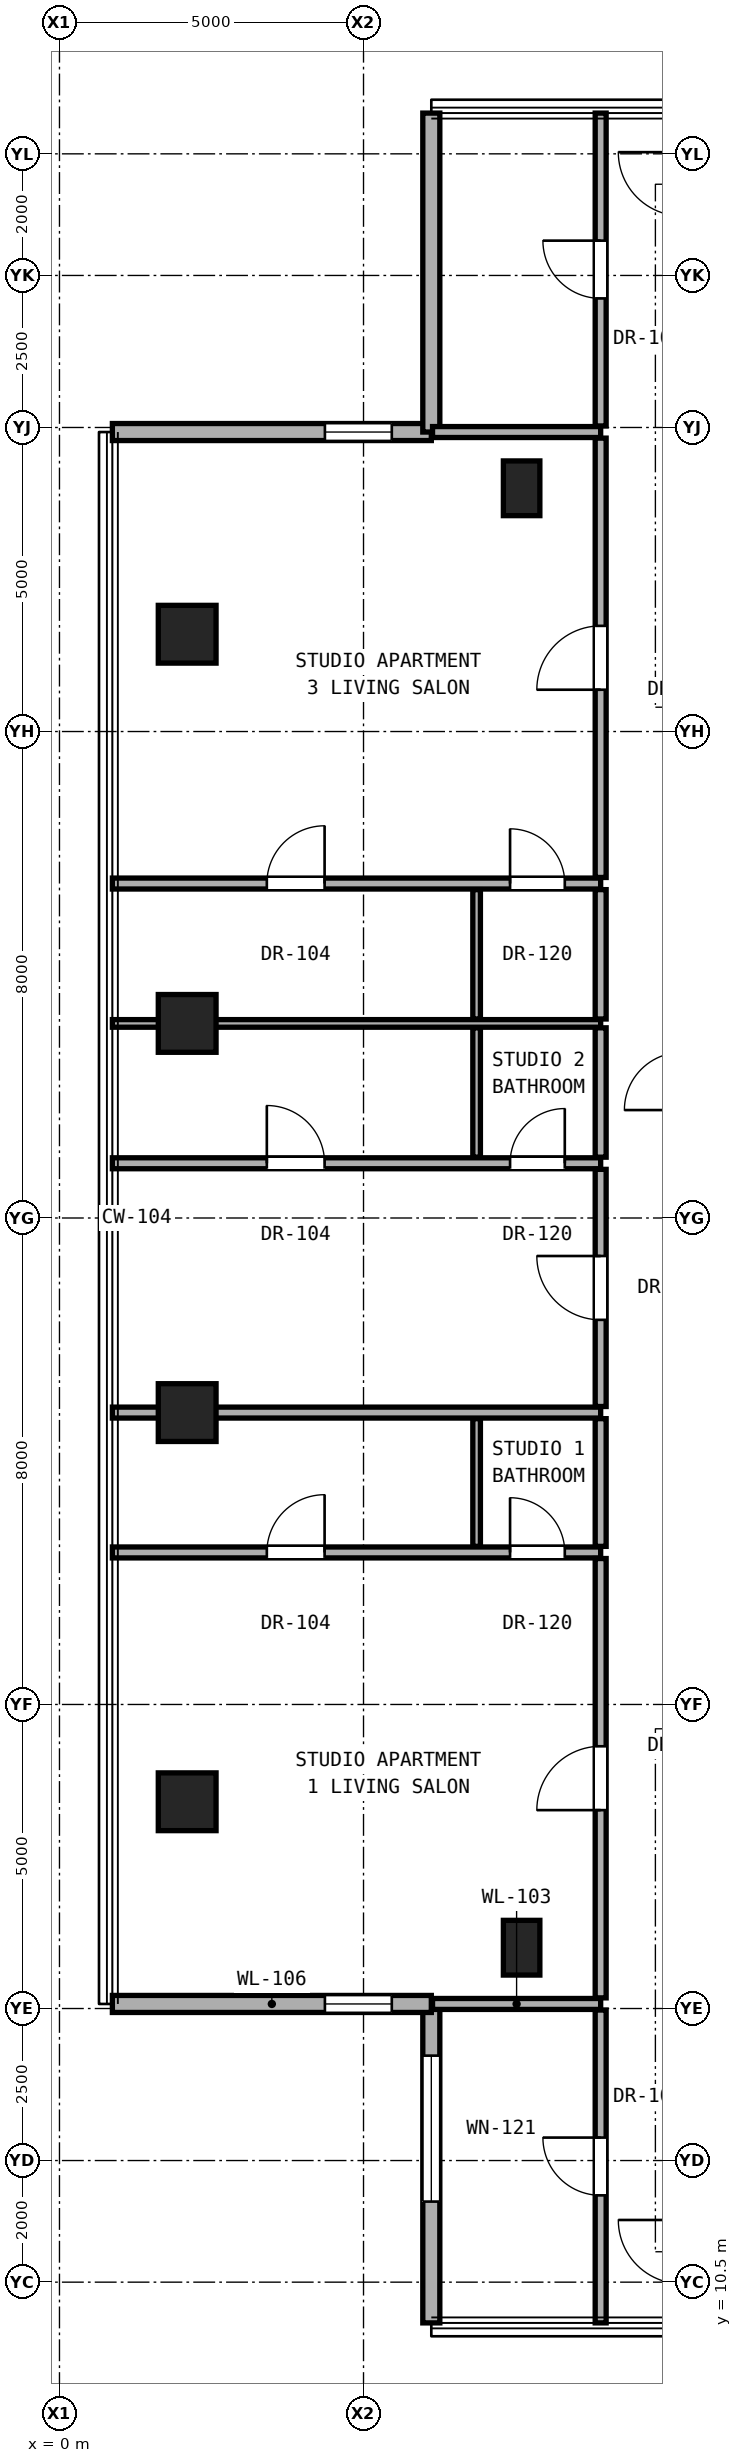
"""IFC4 building model, lengths in metres.
Left out: names, types, materials, properties, quantities, classifications, styles, units other than length and angle.
Written with IfcOpenShell. Run it as: python <this file> out.ifc"""

import sys

from ifc_helpers import new_model, si_unit, direction, frame, frame_2d, origin, origin_2d, place, context, subcontext, project, spatial, rectangle, hollow_rectangle, extrude, element, fill, save


model = new_model("IFC4")
c1 = context("Model", 3, precision=1e-05, world=origin(), true_north=direction((0.0, 1.0)))
c2 = subcontext(c1, "Body", "Model", "MODEL_VIEW")
j1 = project(units=[si_unit("LENGTHUNIT", "METRE"), si_unit("PLANEANGLEUNIT", "RADIAN")], contexts=[c1])
p1 = place(None, origin())
s1 = spatial("IfcSite", under=j1, at=p1, CompositionType="ELEMENT")
p2 = place(p1, origin())
s2 = spatial("IfcBuilding", under=s1, at=p2, CompositionType="ELEMENT")
p3 = place(p2, frame((0.0, 0.0, 154.4)))
s3 = spatial("IfcBuildingStorey", under=s2, at=p3, CompositionType="ELEMENT", Elevation=154.4)
for number, where, z_axis, x_axis in (
    (1, (2.1, 18.4, 0.0), (0.0, 0.0, 1.0), (1.0, 0.0, 0.0)),
    (2, (2.1, 24.8, 0.0), (0.0, 0.0, 1.0), (1.0, 0.0, 0.0)),
    (3, (2.1, 31.2, 0.0), (0.0, 0.0, 1.0), (1.0, 0.0, 0.0)),
    (4, (2.1, 37.6, 0.0), (0.0, 0.0, 1.0), (1.0, 0.0, 0.0)),
):
    element("IfcColumn", number, at=place(p3, frame(where, z_axis=z_axis, x_axis=x_axis)), inside=s3, PredefinedType="COLUMN", context=c2, shape_type="SweptSolid", body=[
        extrude(hollow_rectangle(XDim=0.95, YDim=0.95, WallThickness=0.05, at=origin_2d()), origin(), (0.0, 0.0, 1.0), 3.25),
    ])
for number, where, z_axis, x_axis in (
    (5, (7.6, 16.0, 0.0), (0.0, 0.0, 1.0), (1.0, 0.0, 0.0)),
    (6, (7.6, 40.0, 0.0), (0.0, 0.0, 1.0), (1.0, 0.0, 0.0)),
):
    element("IfcColumn", number, at=place(p3, frame(where, z_axis=z_axis, x_axis=x_axis)), inside=s3, PredefinedType="PILASTER", context=c2, shape_type="SweptSolid", body=[
        extrude(rectangle(XDim=0.6, YDim=0.9, at=origin_2d()), origin(), (0.0, 0.0, 1.0), 3.25),
    ])
p4 = place(p3, frame((6.115, 15.075, 0.0), z_axis=(0.0, 0.0, 1.0), x_axis=(0.0, -1.0, 0.0)))
e7 = element("IfcWall", 7, at=p4, inside=s3, PredefinedType="SOLIDWALL", context=c2, shape_type="SweptSolid", body=[
    extrude(rectangle(XDim=5.245, YDim=0.28, at=frame_2d((2.623, 0.0))), origin(), (0.0, 0.0, 1.0), 3.03),
])
p5 = place(p4, frame((0.85, 0.0, 0.53)))
e8 = element("IfcOpeningElement", 8, at=p5, cuts=e7, PredefinedType="OPENING", context=c2, shape_type="SweptSolid", body=[
    extrude(rectangle(XDim=2.4, YDim=2.35, at=frame_2d((1.2, 1.175))), frame((0.0, 0.15, 0.0), z_axis=(0.0, -1.0, 0.0), x_axis=(1.0, 0.0, 0.0)), (0.0, 0.0, 1.0), 0.3),
])
p6 = place(p3, frame((0.87, 15.075, 0.0), z_axis=(0.0, 0.0, 1.0), x_axis=(1.0, 0.0, 0.0)))
e9 = element("IfcWall", 9, at=p6, inside=s3, PredefinedType="SOLIDWALL", context=c2, shape_type="SweptSolid", body=[
    extrude(rectangle(XDim=5.245, YDim=0.28, at=frame_2d((2.623, 0.0))), origin(), (0.0, 0.0, 1.0), 3.03),
])
p7 = place(p6, frame((3.495, 0.0, 0.85)))
e10 = element("IfcOpeningElement", 10, at=p7, cuts=e9, PredefinedType="OPENING", context=c2, shape_type="SweptSolid", body=[
    extrude(rectangle(XDim=1.1, YDim=2.0, at=frame_2d((0.55, 1.0))), frame((0.0, 0.15, 0.0), z_axis=(0.0, -1.0, 0.0), x_axis=(1.0, 0.0, 0.0)), (0.0, 0.0, 1.0), 0.3),
])
p8 = place(p3, frame((6.115, 40.925, 0.0), z_axis=(0.0, 0.0, 1.0), x_axis=(-1.0, 0.0, 0.0)))
e11 = element("IfcWall", 11, at=p8, inside=s3, PredefinedType="SOLIDWALL", context=c2, shape_type="SweptSolid", body=[
    extrude(rectangle(XDim=5.245, YDim=0.28, at=frame_2d((2.623, 0.0))), origin(), (0.0, 0.0, 1.0), 3.03),
])
p9 = place(p8, frame((0.65, 0.0, 0.85)))
e12 = element("IfcOpeningElement", 12, at=p9, cuts=e11, PredefinedType="OPENING", context=c2, shape_type="SweptSolid", body=[
    extrude(rectangle(XDim=1.1, YDim=2.0, at=frame_2d((0.55, 1.0))), frame((0.0, 0.15, 0.0), z_axis=(0.0, -1.0, 0.0), x_axis=(1.0, 0.0, 0.0)), (0.0, 0.0, 1.0), 0.3),
])
p10 = place(p3, frame((6.115, 46.17, 0.0), z_axis=(0.0, 0.0, 1.0), x_axis=(0.0, -1.0, 0.0)))
e13 = element("IfcWall", 13, at=p10, inside=s3, PredefinedType="SOLIDWALL", context=c2, shape_type="SweptSolid", body=[
    extrude(rectangle(XDim=5.245, YDim=0.28, at=frame_2d((2.623, 0.0))), origin(), (0.0, 0.0, 1.0), 3.03),
])
p11 = place(p3, frame((6.135, 15.075, 0.0), z_axis=(0.0, 0.0, 1.0), x_axis=(1.0, 0.0, 0.0)))
e14 = element("IfcWall", 14, at=p11, inside=s3, PredefinedType="PARTITIONING", context=c2, shape_type="SweptSolid", body=[
    extrude(rectangle(XDim=2.765, YDim=0.18, at=frame_2d((1.382, 0.0))), origin(), (0.0, 0.0, 1.0), 3.05),
])
p12 = place(p3, frame((0.87, 22.5, 0.0), z_axis=(0.0, 0.0, 1.0), x_axis=(1.0, 0.0, 0.0)))
e15 = element("IfcWall", 15, at=p12, inside=s3, PredefinedType="PARTITIONING", context=c2, shape_type="SweptSolid", body=[
    extrude(rectangle(XDim=8.03, YDim=0.18, at=frame_2d((4.015, 0.0))), origin(), (0.0, 0.0, 1.0), 2.269),
])
p13 = place(p12, frame((2.54, 0.0, 0.0)))
e16 = element("IfcOpeningElement", 16, at=p13, cuts=e15, PredefinedType="OPENING", context=c2, shape_type="SweptSolid", body=[
    extrude(rectangle(XDim=0.95, YDim=2.15, at=frame_2d((0.475, 1.075))), frame((0.0, 0.1, 0.0), z_axis=(0.0, -1.0, 0.0), x_axis=(1.0, 0.0, 0.0)), (0.0, 0.0, 1.0), 0.2),
])
p14 = place(p12, frame((6.54, 0.0, 0.0)))
e17 = element("IfcOpeningElement", 17, at=p14, cuts=e15, PredefinedType="OPENING", context=c2, shape_type="SweptSolid", body=[
    extrude(rectangle(XDim=0.9, YDim=2.1, at=frame_2d((0.45, 1.05))), frame((0.0, 0.1, 0.0), z_axis=(0.0, -1.0, 0.0), x_axis=(1.0, 0.0, 0.0)), (0.0, 0.0, 1.0), 0.2),
])
p15 = place(p3, frame((0.87, 24.8, 0.0), z_axis=(0.0, 0.0, 1.0), x_axis=(1.0, 0.0, 0.0)))
e18 = element("IfcWall", 18, at=p15, inside=s3, PredefinedType="PARTITIONING", context=c2, shape_type="SweptSolid", body=[
    extrude(rectangle(XDim=8.03, YDim=0.18, at=frame_2d((4.015, 0.0))), origin(), (0.0, 0.0, 1.0), 2.269),
])
p16 = place(p3, frame((0.87, 28.9, 0.0), z_axis=(0.0, 0.0, 1.0), x_axis=(1.0, 0.0, 0.0)))
e19 = element("IfcWall", 19, at=p16, inside=s3, PredefinedType="PARTITIONING", context=c2, shape_type="SweptSolid", body=[
    extrude(rectangle(XDim=8.03, YDim=0.18, at=frame_2d((4.015, 0.0))), origin(), (0.0, 0.0, 1.0), 2.269),
])
p17 = place(p16, frame((2.54, 0.0, 0.0)))
e20 = element("IfcOpeningElement", 20, at=p17, cuts=e19, PredefinedType="OPENING", context=c2, shape_type="SweptSolid", body=[
    extrude(rectangle(XDim=0.95, YDim=2.15, at=frame_2d((0.475, 1.075))), frame((0.0, 0.1, 0.0), z_axis=(0.0, -1.0, 0.0), x_axis=(1.0, 0.0, 0.0)), (0.0, 0.0, 1.0), 0.2),
])
p18 = place(p16, frame((6.54, 0.0, 0.0)))
e21 = element("IfcOpeningElement", 21, at=p18, cuts=e19, PredefinedType="OPENING", context=c2, shape_type="SweptSolid", body=[
    extrude(rectangle(XDim=0.9, YDim=2.1, at=frame_2d((0.45, 1.05))), frame((0.0, 0.1, 0.0), z_axis=(0.0, -1.0, 0.0), x_axis=(1.0, 0.0, 0.0)), (0.0, 0.0, 1.0), 0.2),
])
p19 = place(p3, frame((0.87, 31.2, 0.0), z_axis=(0.0, 0.0, 1.0), x_axis=(1.0, 0.0, 0.0)))
e22 = element("IfcWall", 22, at=p19, inside=s3, PredefinedType="PARTITIONING", context=c2, shape_type="SweptSolid", body=[
    extrude(rectangle(XDim=8.03, YDim=0.125, at=frame_2d((4.015, 0.0))), origin(), (0.0, 0.0, 1.0), 2.269),
])
p20 = place(p3, frame((0.87, 33.5, 0.0), z_axis=(0.0, 0.0, 1.0), x_axis=(1.0, 0.0, 0.0)))
e23 = element("IfcWall", 23, at=p20, inside=s3, PredefinedType="PARTITIONING", context=c2, shape_type="SweptSolid", body=[
    extrude(rectangle(XDim=8.03, YDim=0.18, at=frame_2d((4.015, 0.0))), origin(), (0.0, 0.0, 1.0), 2.269),
])
p21 = place(p20, frame((2.54, 0.0, 0.0)))
e24 = element("IfcOpeningElement", 24, at=p21, cuts=e23, PredefinedType="OPENING", context=c2, shape_type="SweptSolid", body=[
    extrude(rectangle(XDim=0.95, YDim=2.15, at=frame_2d((0.475, 1.075))), frame((0.0, 0.1, 0.0), z_axis=(0.0, -1.0, 0.0), x_axis=(1.0, 0.0, 0.0)), (0.0, 0.0, 1.0), 0.2),
])
p22 = place(p20, frame((6.54, 0.0, 0.0)))
e25 = element("IfcOpeningElement", 25, at=p22, cuts=e23, PredefinedType="OPENING", context=c2, shape_type="SweptSolid", body=[
    extrude(rectangle(XDim=0.9, YDim=2.1, at=frame_2d((0.45, 1.05))), frame((0.0, 0.1, 0.0), z_axis=(0.0, -1.0, 0.0), x_axis=(1.0, 0.0, 0.0)), (0.0, 0.0, 1.0), 0.2),
])
p23 = place(p3, frame((6.135, 40.925, 0.0), z_axis=(0.0, 0.0, 1.0), x_axis=(1.0, 0.0, 0.0)))
e26 = element("IfcWall", 26, at=p23, inside=s3, PredefinedType="PARTITIONING", context=c2, shape_type="SweptSolid", body=[
    extrude(rectangle(XDim=2.765, YDim=0.18, at=frame_2d((1.382, 0.0))), origin(), (0.0, 0.0, 1.0), 3.05),
])
p24 = place(p3, frame((6.86, 22.6, 0.0), z_axis=(0.0, 0.0, 1.0), x_axis=(0.0, 1.0, 0.0)))
e27 = element("IfcWall", 27, at=p24, inside=s3, PredefinedType="PARTITIONING", context=c2, shape_type="SweptSolid", body=[
    extrude(rectangle(XDim=2.1, YDim=0.125, at=frame_2d((1.05, 0.0))), origin(), (0.0, 0.0, 1.0), 2.346),
])
for number, where, z_axis, x_axis in (
    (28, (6.86, 29.0, 0.0), (0.0, 0.0, 1.0), (0.0, 1.0, 0.0)),
    (29, (6.86, 31.272, 0.0), (0.0, 0.0, 1.0), (0.0, 1.0, 0.0)),
):
    element("IfcWall", number, at=place(p3, frame(where, z_axis=z_axis, x_axis=x_axis)), inside=s3, PredefinedType="PARTITIONING", context=c2, shape_type="SweptSolid", body=[
        extrude(rectangle(XDim=2.127, YDim=0.125, at=frame_2d((1.064, 0.0))), origin(), (0.0, 0.0, 1.0), 2.346),
    ])
p25 = place(p3, frame((8.9, 9.83, 0.0), z_axis=(0.0, 0.0, 1.0), x_axis=(0.0, 1.0, 0.0)))
e30 = element("IfcWall", 30, at=p25, inside=s3, PredefinedType="PARTITIONING", context=c2, shape_type="SweptSolid", body=[
    extrude(rectangle(XDim=5.145, YDim=0.18, at=frame_2d((2.573, 0.0))), origin(), (0.0, 0.0, 1.0), 3.05),
])
p26 = place(p25, frame((2.097, 0.0, 0.0)))
e31 = element("IfcOpeningElement", 31, at=p26, cuts=e30, PredefinedType="OPENING", context=c2, shape_type="SweptSolid", body=[
    extrude(rectangle(XDim=0.95, YDim=2.15, at=frame_2d((0.475, 1.075))), frame((0.0, 0.1, 0.0), z_axis=(0.0, -1.0, 0.0), x_axis=(1.0, 0.0, 0.0)), (0.0, 0.0, 1.0), 0.2),
])
p27 = place(p3, frame((8.9, 15.175, 0.0), z_axis=(0.0, 0.0, 1.0), x_axis=(0.0, 1.0, 0.0)))
e32 = element("IfcWall", 32, at=p27, inside=s3, PredefinedType="PARTITIONING", context=c2, shape_type="SweptSolid", body=[
    extrude(rectangle(XDim=7.225, YDim=0.18, at=frame_2d((3.612, 0.0))), origin(), (0.0, 0.0, 1.0), 2.442),
])
p28 = place(p27, frame((3.087, 0.0, 0.0)))
e33 = element("IfcOpeningElement", 33, at=p28, cuts=e32, PredefinedType="OPENING", context=c2, shape_type="SweptSolid", body=[
    extrude(rectangle(XDim=1.05, YDim=2.2, at=frame_2d((0.525, 1.1))), frame((0.0, 0.1, 0.0), z_axis=(0.0, -1.0, 0.0), x_axis=(1.0, 0.0, 0.0)), (0.0, 0.0, 1.0), 0.2),
])
p29 = place(p3, frame((8.9, 22.6, 0.0), z_axis=(0.0, 0.0, 1.0), x_axis=(0.0, 1.0, 0.0)))
e34 = element("IfcWall", 34, at=p29, inside=s3, PredefinedType="PARTITIONING", context=c2, shape_type="SweptSolid", body=[
    extrude(rectangle(XDim=2.1, YDim=0.18, at=frame_2d((1.05, 0.0))), origin(), (0.0, 0.0, 1.0), 2.346),
])
p30 = place(p3, frame((8.9, 24.9, 0.0), z_axis=(0.0, 0.0, 1.0), x_axis=(0.0, 1.0, 0.0)))
e35 = element("IfcWall", 35, at=p30, inside=s3, PredefinedType="PARTITIONING", context=c2, shape_type="SweptSolid", body=[
    extrude(rectangle(XDim=3.9, YDim=0.18, at=frame_2d((1.95, 0.0))), origin(), (0.0, 0.0, 1.0), 2.346),
])
p31 = place(p30, frame((1.425, 0.0, 0.0)))
e36 = element("IfcOpeningElement", 36, at=p31, cuts=e35, PredefinedType="OPENING", context=c2, shape_type="SweptSolid", body=[
    extrude(rectangle(XDim=1.05, YDim=2.2, at=frame_2d((0.525, 1.1))), frame((0.0, 0.1, 0.0), z_axis=(0.0, -1.0, 0.0), x_axis=(1.0, 0.0, 0.0)), (0.0, 0.0, 1.0), 0.2),
])
for number, where, z_axis, x_axis in (
    (37, (8.9, 29.0, 0.0), (0.0, 0.0, 1.0), (0.0, 1.0, 0.0)),
    (38, (8.9, 31.272, 0.0), (0.0, 0.0, 1.0), (0.0, 1.0, 0.0)),
):
    element("IfcWall", number, at=place(p3, frame(where, z_axis=z_axis, x_axis=x_axis)), inside=s3, PredefinedType="PARTITIONING", context=c2, shape_type="SweptSolid", body=[
        extrude(rectangle(XDim=2.127, YDim=0.18, at=frame_2d((1.064, 0.0))), origin(), (0.0, 0.0, 1.0), 2.346),
    ])
p32 = place(p3, frame((8.9, 33.6, 0.0), z_axis=(0.0, 0.0, 1.0), x_axis=(0.0, 1.0, 0.0)))
e39 = element("IfcWall", 39, at=p32, inside=s3, PredefinedType="PARTITIONING", context=c2, shape_type="SweptSolid", body=[
    extrude(rectangle(XDim=7.225, YDim=0.18, at=frame_2d((3.612, 0.0))), origin(), (0.0, 0.0, 1.0), 2.442),
])
p33 = place(p32, frame((3.087, 0.0, 0.0)))
e40 = element("IfcOpeningElement", 40, at=p33, cuts=e39, PredefinedType="OPENING", context=c2, shape_type="SweptSolid", body=[
    extrude(rectangle(XDim=1.05, YDim=2.2, at=frame_2d((0.525, 1.1))), frame((0.0, 0.1, 0.0), z_axis=(0.0, -1.0, 0.0), x_axis=(1.0, 0.0, 0.0)), (0.0, 0.0, 1.0), 0.2),
])
p34 = place(p3, frame((8.9, 41.025, 0.0), z_axis=(0.0, 0.0, 1.0), x_axis=(0.0, 1.0, 0.0)))
e41 = element("IfcWall", 41, at=p34, inside=s3, PredefinedType="PARTITIONING", context=c2, shape_type="SweptSolid", body=[
    extrude(rectangle(XDim=5.145, YDim=0.18, at=frame_2d((2.573, 0.0))), origin(), (0.0, 0.0, 1.0), 3.05),
])
p35 = place(p34, frame((2.097, 0.0, 0.0)))
e42 = element("IfcOpeningElement", 42, at=p35, cuts=e41, PredefinedType="OPENING", context=c2, shape_type="SweptSolid", body=[
    extrude(rectangle(XDim=0.95, YDim=2.15, at=frame_2d((0.475, 1.075))), frame((0.0, 0.1, 0.0), z_axis=(0.0, -1.0, 0.0), x_axis=(1.0, 0.0, 0.0)), (0.0, 0.0, 1.0), 0.2),
])
p36 = place(p5, origin())
e43 = element("IfcWindow", 43, at=p36, inside=s3, PartitioningType="SINGLE_PANEL", PredefinedType="WINDOW", context=c2, shape_type="SweptSolid", body=[
    extrude(rectangle(XDim=2.4, YDim=2.35, at=frame_2d((1.2, 1.175))), frame((0.0, 0.03, 0.0), z_axis=(0.0, -1.0, 0.0), x_axis=(1.0, 0.0, 0.0)), (0.0, 0.0, 1.0), 0.06),
])
fill(e8, e43)
p37 = place(p7, origin())
e44 = element("IfcWindow", 44, at=p37, inside=s3, PartitioningType="SINGLE_PANEL", PredefinedType="WINDOW", context=c2, shape_type="SweptSolid", body=[
    extrude(rectangle(XDim=1.1, YDim=2.0, at=frame_2d((0.55, 1.0))), frame((0.0, 0.03, 0.0), z_axis=(0.0, -1.0, 0.0), x_axis=(1.0, 0.0, 0.0)), (0.0, 0.0, 1.0), 0.06),
])
fill(e10, e44)
p38 = place(p9, origin())
e45 = element("IfcWindow", 45, at=p38, inside=s3, PartitioningType="SINGLE_PANEL", PredefinedType="WINDOW", context=c2, shape_type="SweptSolid", body=[
    extrude(rectangle(XDim=1.1, YDim=2.0, at=frame_2d((0.55, 1.0))), frame((0.0, 0.03, 0.0), z_axis=(0.0, -1.0, 0.0), x_axis=(1.0, 0.0, 0.0)), (0.0, 0.0, 1.0), 0.06),
])
fill(e12, e45)
p39 = place(p28, origin())
e46 = element("IfcDoor", 46, at=p39, inside=s3, OperationType="SINGLE_SWING_LEFT", PredefinedType="DOOR", context=c2, shape_type="SweptSolid", body=[
    extrude(rectangle(XDim=1.05, YDim=2.2, at=frame_2d((0.525, 1.1))), frame((0.0, 0.025, 0.0), z_axis=(0.0, -1.0, 0.0), x_axis=(1.0, 0.0, 0.0)), (0.0, 0.0, 1.0), 0.05),
])
fill(e33, e46)
p40 = place(p13, origin())
e47 = element("IfcDoor", 47, at=p40, inside=s3, OperationType="SINGLE_SWING_RIGHT", PredefinedType="DOOR", context=c2, shape_type="SweptSolid", body=[
    extrude(rectangle(XDim=0.95, YDim=2.15, at=frame_2d((0.475, 1.075))), frame((0.0, 0.025, 0.0), z_axis=(0.0, -1.0, 0.0), x_axis=(1.0, 0.0, 0.0)), (0.0, 0.0, 1.0), 0.05),
])
fill(e16, e47)
p41 = place(p14, origin())
e48 = element("IfcDoor", 48, at=p41, inside=s3, OperationType="SINGLE_SWING_LEFT", PredefinedType="DOOR", context=c2, shape_type="SweptSolid", body=[
    extrude(rectangle(XDim=0.9, YDim=2.1, at=frame_2d((0.45, 1.05))), frame((0.0, 0.025, 0.0), z_axis=(0.0, -1.0, 0.0), x_axis=(1.0, 0.0, 0.0)), (0.0, 0.0, 1.0), 0.05),
])
fill(e17, e48)
p42 = place(p31, origin())
e49 = element("IfcDoor", 49, at=p42, inside=s3, OperationType="SINGLE_SWING_RIGHT", PredefinedType="DOOR", context=c2, shape_type="SweptSolid", body=[
    extrude(rectangle(XDim=1.05, YDim=2.2, at=frame_2d((0.525, 1.1))), frame((0.0, 0.025, 0.0), z_axis=(0.0, -1.0, 0.0), x_axis=(1.0, 0.0, 0.0)), (0.0, 0.0, 1.0), 0.05),
])
fill(e36, e49)
p43 = place(p17, origin())
e50 = element("IfcDoor", 50, at=p43, inside=s3, OperationType="SINGLE_SWING_LEFT", PredefinedType="DOOR", context=c2, shape_type="SweptSolid", body=[
    extrude(rectangle(XDim=0.95, YDim=2.15, at=frame_2d((0.475, 1.075))), frame((0.0, 0.025, 0.0), z_axis=(0.0, -1.0, 0.0), x_axis=(1.0, 0.0, 0.0)), (0.0, 0.0, 1.0), 0.05),
])
fill(e20, e50)
p44 = place(p18, origin())
e51 = element("IfcDoor", 51, at=p44, inside=s3, OperationType="SINGLE_SWING_RIGHT", PredefinedType="DOOR", context=c2, shape_type="SweptSolid", body=[
    extrude(rectangle(XDim=0.9, YDim=2.1, at=frame_2d((0.45, 1.05))), frame((0.0, 0.025, 0.0), z_axis=(0.0, -1.0, 0.0), x_axis=(1.0, 0.0, 0.0)), (0.0, 0.0, 1.0), 0.05),
])
fill(e21, e51)
p45 = place(p33, origin())
e52 = element("IfcDoor", 52, at=p45, inside=s3, OperationType="SINGLE_SWING_LEFT", PredefinedType="DOOR", context=c2, shape_type="SweptSolid", body=[
    extrude(rectangle(XDim=1.05, YDim=2.2, at=frame_2d((0.525, 1.1))), frame((0.0, 0.025, 0.0), z_axis=(0.0, -1.0, 0.0), x_axis=(1.0, 0.0, 0.0)), (0.0, 0.0, 1.0), 0.05),
])
fill(e40, e52)
p46 = place(p21, origin())
e53 = element("IfcDoor", 53, at=p46, inside=s3, OperationType="SINGLE_SWING_RIGHT", PredefinedType="DOOR", context=c2, shape_type="SweptSolid", body=[
    extrude(rectangle(XDim=0.95, YDim=2.15, at=frame_2d((0.475, 1.075))), frame((0.0, 0.025, 0.0), z_axis=(0.0, -1.0, 0.0), x_axis=(1.0, 0.0, 0.0)), (0.0, 0.0, 1.0), 0.05),
])
fill(e24, e53)
p47 = place(p22, origin())
e54 = element("IfcDoor", 54, at=p47, inside=s3, OperationType="SINGLE_SWING_LEFT", PredefinedType="DOOR", context=c2, shape_type="SweptSolid", body=[
    extrude(rectangle(XDim=0.9, YDim=2.1, at=frame_2d((0.45, 1.05))), frame((0.0, 0.025, 0.0), z_axis=(0.0, -1.0, 0.0), x_axis=(1.0, 0.0, 0.0)), (0.0, 0.0, 1.0), 0.05),
])
fill(e25, e54)
p48 = place(p26, origin())
e55 = element("IfcDoor", 55, at=p48, inside=s3, OperationType="SINGLE_SWING_RIGHT", PredefinedType="DOOR", context=c2, shape_type="SweptSolid", body=[
    extrude(rectangle(XDim=0.95, YDim=2.15, at=frame_2d((0.475, 1.075))), frame((0.0, 0.025, 0.0), z_axis=(0.0, -1.0, 0.0), x_axis=(1.0, 0.0, 0.0)), (0.0, 0.0, 1.0), 0.05),
])
fill(e31, e55)
p49 = place(p35, origin())
e56 = element("IfcDoor", 56, at=p49, inside=s3, OperationType="SINGLE_SWING_RIGHT", PredefinedType="DOOR", context=c2, shape_type="SweptSolid", body=[
    extrude(rectangle(XDim=0.95, YDim=2.15, at=frame_2d((0.475, 1.075))), frame((0.0, 0.025, 0.0), z_axis=(0.0, -1.0, 0.0), x_axis=(1.0, 0.0, 0.0)), (0.0, 0.0, 1.0), 0.05),
])
fill(e42, e56)
save(model, sys.argv[1])
